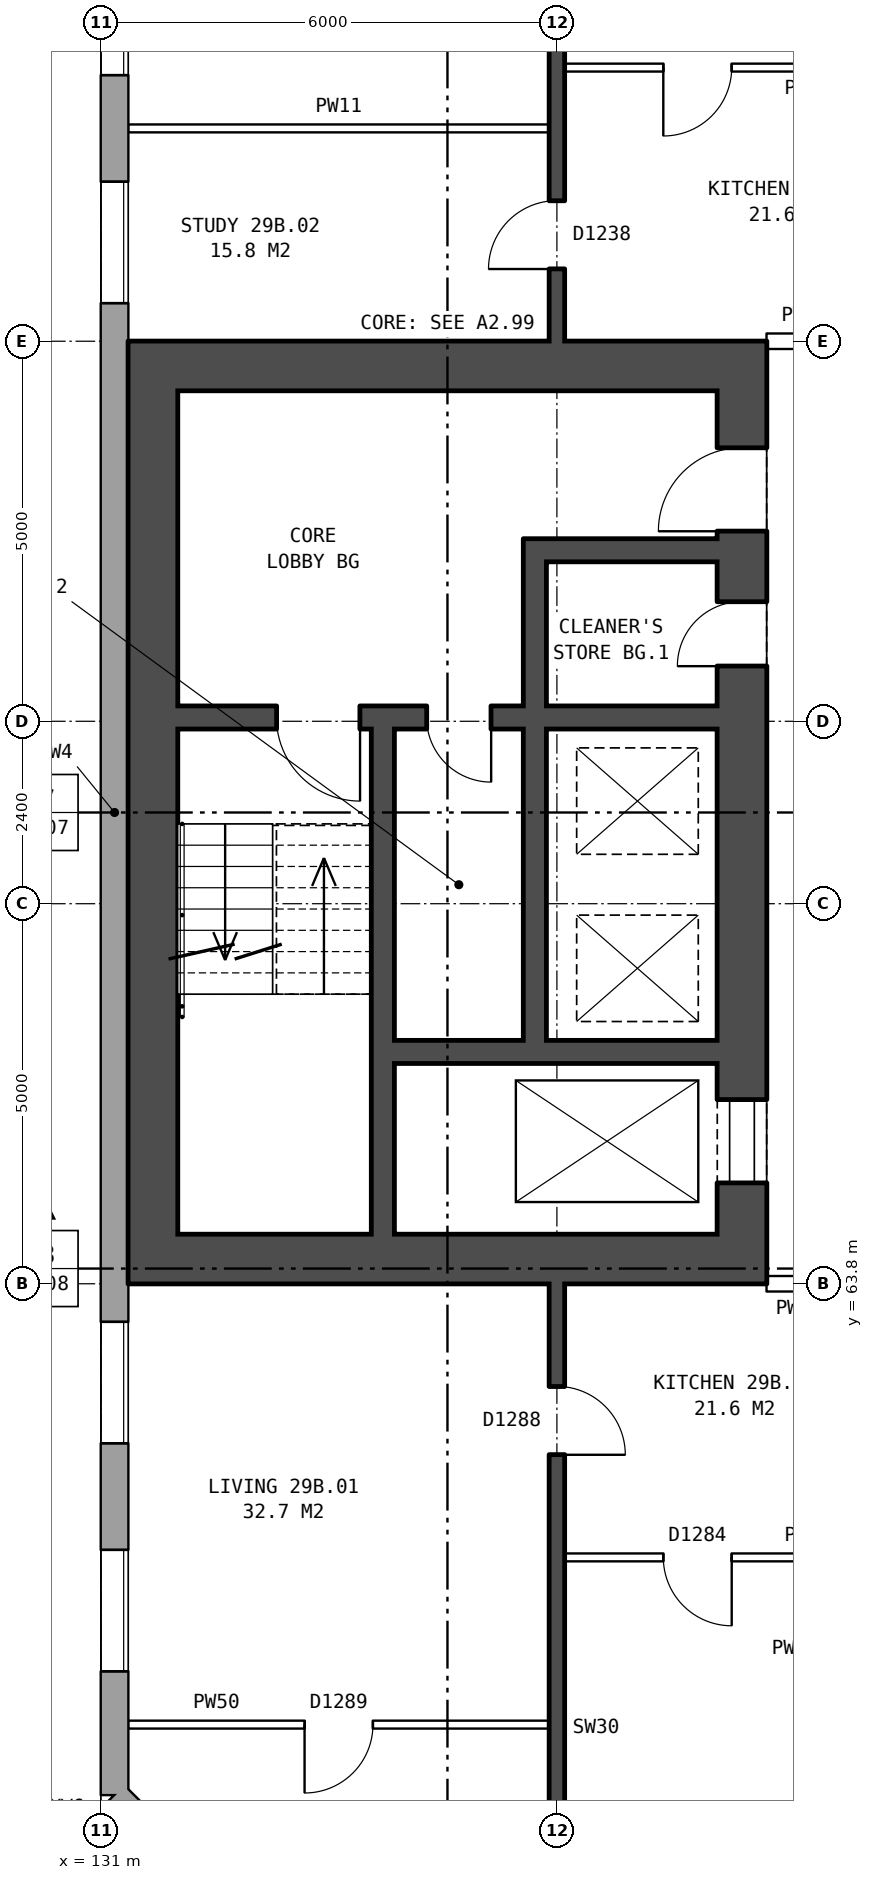
"""IFC4 building model, lengths in metres.
Left out: names, types, materials, properties, quantities, classifications, styles, units other than length and angle.
Written with IfcOpenShell. Run it as: python <this file> out.ifc"""

import sys

from ifc_helpers import new_model, si_unit, direction, frame, frame_2d, origin, place, context, subcontext, project, spatial, rectangle, extrude, element, fill, save


model = new_model("IFC4")
c1 = context("Model", 3, precision=1e-05, world=origin(), true_north=direction((0.0, 1.0)))
c2 = subcontext(c1, "Body", "Model", "MODEL_VIEW")
j1 = project(units=[si_unit("LENGTHUNIT", "METRE"), si_unit("PLANEANGLEUNIT", "RADIAN")], contexts=[c1])
p1 = place(None, origin())
s1 = spatial("IfcSite", under=j1, at=p1, CompositionType="ELEMENT")
p2 = place(p1, origin())
s2 = spatial("IfcBuilding", under=s1, at=p2, CompositionType="ELEMENT")
p3 = place(p2, frame((0.0, 0.0, 105.7)))
s3 = spatial("IfcBuildingStorey", under=s2, at=p3, CompositionType="ELEMENT", Elevation=105.7)
p4 = place(p3, frame((131.18, 57.075, 0.0), z_axis=(0.0, 0.0, 1.0), x_axis=(0.707106781187, -0.707106781187, 0.0)))
e1 = element("IfcWall", 1, at=p4, inside=s3, PredefinedType="STANDARD", context=c2, shape_type="SweptSolid", body=[
    extrude(rectangle(XDim=4.094, YDim=0.36, at=frame_2d((2.047, 0.0))), origin(), (0.0, 0.0, 1.0), 2.85),
])
p5 = place(p4, frame((1.247, 0.0, 0.8)))
e2 = element("IfcOpeningElement", 2, at=p5, cuts=e1, PredefinedType="OPENING", context=c2, shape_type="SweptSolid", body=[
    extrude(rectangle(XDim=1.6, YDim=1.8, at=frame_2d((0.8, 0.9))), frame((0.0, 0.19, 0.0), z_axis=(0.0, -1.0, 0.0), x_axis=(1.0, 0.0, 0.0)), (0.0, 0.0, 1.0), 0.38),
])
p6 = place(p3, frame((131.18, 82.925, 0.0), z_axis=(0.0, 0.0, 1.0), x_axis=(0.0, -1.0, 0.0)))
e3 = element("IfcWall", 3, at=p6, inside=s3, PredefinedType="STANDARD", context=c2, shape_type="SweptSolid", body=[
    extrude(rectangle(XDim=25.851, YDim=0.36, at=frame_2d((12.925, 0.0))), origin(), (0.0, 0.0, 1.0), 2.85),
])
p7 = place(p6, frame((1.625, 0.0, 0.8)))
e4 = element("IfcOpeningElement", 4, at=p7, cuts=e3, PredefinedType="OPENING", context=c2, shape_type="SweptSolid", body=[
    extrude(rectangle(XDim=1.6, YDim=1.8, at=frame_2d((0.8, 0.9))), frame((0.0, 0.19, 0.0), z_axis=(0.0, -1.0, 0.0), x_axis=(1.0, 0.0, 0.0)), (0.0, 0.0, 1.0), 0.38),
])
p8 = place(p6, frame((4.625, 0.0, 0.8)))
e5 = element("IfcOpeningElement", 5, at=p8, cuts=e3, PredefinedType="OPENING", context=c2, shape_type="SweptSolid", body=[
    extrude(rectangle(XDim=1.6, YDim=1.8, at=frame_2d((0.8, 0.9))), frame((0.0, 0.19, 0.0), z_axis=(0.0, -1.0, 0.0), x_axis=(1.0, 0.0, 0.0)), (0.0, 0.0, 1.0), 0.38),
])
p9 = place(p6, frame((19.625, 0.0, 0.8)))
e6 = element("IfcOpeningElement", 6, at=p9, cuts=e3, PredefinedType="OPENING", context=c2, shape_type="SweptSolid", body=[
    extrude(rectangle(XDim=1.6, YDim=1.8, at=frame_2d((0.8, 0.9))), frame((0.0, 0.19, 0.0), z_axis=(0.0, -1.0, 0.0), x_axis=(1.0, 0.0, 0.0)), (0.0, 0.0, 1.0), 0.38),
])
p10 = place(p6, frame((22.625, 0.0, 0.8)))
e7 = element("IfcOpeningElement", 7, at=p10, cuts=e3, PredefinedType="OPENING", context=c2, shape_type="SweptSolid", body=[
    extrude(rectangle(XDim=1.6, YDim=1.8, at=frame_2d((0.8, 0.9))), frame((0.0, 0.19, 0.0), z_axis=(0.0, -1.0, 0.0), x_axis=(1.0, 0.0, 0.0)), (0.0, 0.0, 1.0), 0.38),
])
p11 = place(p3, frame((139.435, 64.45, 0.0), z_axis=(0.0, 0.0, 1.0), x_axis=(0.0, 1.0, 0.0)))
e8 = element("IfcWall", 8, at=p11, inside=s3, PredefinedType="SHEAR", context=c2, shape_type="SweptSolid", body=[
    extrude(rectangle(XDim=11.1, YDim=0.65, at=frame_2d((5.55, 0.0))), origin(), (0.0, 0.0, 1.0), 2.85),
])
p12 = place(p11, frame((0.675, 0.0, 0.0)))
e9 = element("IfcOpeningElement", 9, at=p12, cuts=e8, PredefinedType="OPENING", context=c2, shape_type="SweptSolid", body=[
    extrude(rectangle(XDim=1.1, YDim=2.1, at=frame_2d((0.55, 1.05))), frame((0.0, 0.335, 0.0), z_axis=(0.0, -1.0, 0.0), x_axis=(1.0, 0.0, 0.0)), (0.0, 0.0, 1.0), 0.67),
])
p13 = place(p11, frame((9.25, 0.0, 0.0)))
e10 = element("IfcOpeningElement", 10, at=p13, cuts=e8, PredefinedType="OPENING", context=c2, shape_type="SweptSolid", body=[
    extrude(rectangle(XDim=1.1, YDim=2.1, at=frame_2d((0.55, 1.05))), frame((0.0, 0.335, 0.0), z_axis=(0.0, -1.0, 0.0), x_axis=(1.0, 0.0, 0.0)), (0.0, 0.0, 1.0), 0.67),
])
p14 = place(p11, frame((7.475, 0.0, 0.0)))
e11 = element("IfcOpeningElement", 11, at=p14, cuts=e8, PredefinedType="OPENING", context=c2, shape_type="SweptSolid", body=[
    extrude(rectangle(XDim=0.85, YDim=2.1, at=frame_2d((0.425, 1.05))), frame((0.0, 0.335, 0.0), z_axis=(0.0, -1.0, 0.0), x_axis=(1.0, 0.0, 0.0)), (0.0, 0.0, 1.0), 0.67),
])
p15 = place(p3, frame((131.685, 64.45, 0.0), z_axis=(0.0, 0.0, 1.0), x_axis=(0.0, 1.0, 0.0)))
e12 = element("IfcWall", 12, at=p15, inside=s3, PredefinedType="SHEAR", context=c2, shape_type="SweptSolid", body=[
    extrude(rectangle(XDim=11.1, YDim=0.65, at=frame_2d((5.55, 0.0))), origin(), (0.0, 0.0, 1.0), 2.85),
])
for number, where, z_axis, x_axis in (
    (13, (139.76, 64.125, 0.0), (0.0, 0.0, 1.0), (-1.0, 0.0, 0.0)),
    (14, (139.76, 75.875, 0.0), (0.0, 0.0, 1.0), (-1.0, 0.0, 0.0)),
):
    element("IfcWall", number, at=place(p3, frame(where, z_axis=z_axis, x_axis=x_axis)), inside=s3, PredefinedType="SHEAR", context=c2, shape_type="SweptSolid", body=[
        extrude(rectangle(XDim=8.4, YDim=0.65, at=frame_2d((4.2, 0.0))), origin(), (0.0, 0.0, 1.0), 2.85),
    ])
p16 = place(p3, frame((139.11, 66.85, 0.0), z_axis=(0.0, 0.0, 1.0), x_axis=(-1.0, 0.0, 0.0)))
e15 = element("IfcWall", 15, at=p16, inside=s3, PredefinedType="SHEAR", context=c2, shape_type="SweptSolid", body=[
    extrude(rectangle(XDim=4.25, YDim=0.3, at=frame_2d((2.125, 0.0))), origin(), (0.0, 0.0, 1.0), 2.85),
])
p17 = place(p3, frame((139.11, 71.25, 0.0), z_axis=(0.0, 0.0, 1.0), x_axis=(-1.0, 0.0, 0.0)))
e16 = element("IfcWall", 16, at=p17, inside=s3, PredefinedType="SHEAR", context=c2, shape_type="SweptSolid", body=[
    extrude(rectangle(XDim=7.1, YDim=0.3, at=frame_2d((3.55, 0.0))), origin(), (0.0, 0.0, 1.0), 2.85),
])
p18 = place(p17, frame((4.7, 0.0, 0.0)))
e17 = element("IfcOpeningElement", 17, at=p18, cuts=e16, PredefinedType="OPENING", context=c2, shape_type="SweptSolid", body=[
    extrude(rectangle(XDim=1.1, YDim=2.1, at=frame_2d((0.55, 1.05))), frame((0.0, 0.16, 0.0), z_axis=(0.0, -1.0, 0.0), x_axis=(1.0, 0.0, 0.0)), (0.0, 0.0, 1.0), 0.32),
])
p19 = place(p17, frame((2.975, 0.0, 0.0)))
e18 = element("IfcOpeningElement", 18, at=p19, cuts=e16, PredefinedType="OPENING", context=c2, shape_type="SweptSolid", body=[
    extrude(rectangle(XDim=0.85, YDim=2.1, at=frame_2d((0.425, 1.05))), frame((0.0, 0.16, 0.0), z_axis=(0.0, -1.0, 0.0), x_axis=(1.0, 0.0, 0.0)), (0.0, 0.0, 1.0), 0.32),
])
p20 = place(p3, frame((139.11, 73.45, 0.0), z_axis=(0.0, 0.0, 1.0), x_axis=(-1.0, 0.0, 0.0)))
e19 = element("IfcWall", 19, at=p20, inside=s3, PredefinedType="SHEAR", context=c2, shape_type="SweptSolid", body=[
    extrude(rectangle(XDim=2.25, YDim=0.3, at=frame_2d((1.125, 0.0))), origin(), (0.0, 0.0, 1.0), 2.85),
])
p21 = place(p3, frame((136.71, 67.0, 0.0), z_axis=(0.0, 0.0, 1.0), x_axis=(0.0, 1.0, 0.0)))
e20 = element("IfcWall", 20, at=p21, inside=s3, PredefinedType="SHEAR", context=c2, shape_type="SweptSolid", body=[
    extrude(rectangle(XDim=4.1, YDim=0.3, at=frame_2d((2.05, 0.0))), origin(), (0.0, 0.0, 1.0), 2.85),
])
p22 = place(p3, frame((136.71, 71.4, 0.0), z_axis=(0.0, 0.0, 1.0), x_axis=(0.0, 1.0, 0.0)))
e21 = element("IfcWall", 21, at=p22, inside=s3, PredefinedType="SHEAR", context=c2, shape_type="SweptSolid", body=[
    extrude(rectangle(XDim=2.2, YDim=0.3, at=frame_2d((1.1, 0.0))), origin(), (0.0, 0.0, 1.0), 2.85),
])
p23 = place(p3, frame((134.71, 64.45, 0.0), z_axis=(0.0, 0.0, 1.0), x_axis=(0.0, 1.0, 0.0)))
e22 = element("IfcWall", 22, at=p23, inside=s3, PredefinedType="SHEAR", context=c2, shape_type="SweptSolid", body=[
    extrude(rectangle(XDim=6.65, YDim=0.3, at=frame_2d((3.325, 0.0))), origin(), (0.0, 0.0, 1.0), 2.85),
])
p24 = place(p3, frame((131.36, 58.0, 0.0), z_axis=(0.0, 0.0, 1.0), x_axis=(1.0, 0.0, 0.0)))
e23 = element("IfcWall", 23, at=p24, inside=s3, PredefinedType="PARTITIONING", context=c2, shape_type="SweptSolid", body=[
    extrude(rectangle(XDim=5.54, YDim=0.1, at=frame_2d((2.77, 0.0))), origin(), (0.0, 0.0, 1.0), 2.85),
])
p25 = place(p24, frame((2.32, 0.0, 0.0)))
e24 = element("IfcOpeningElement", 24, at=p25, cuts=e23, PredefinedType="OPENING", context=c2, shape_type="SweptSolid", body=[
    extrude(rectangle(XDim=0.9, YDim=2.1, at=frame_2d((0.45, 1.05))), frame((0.0, 0.06, 0.0), z_axis=(0.0, -1.0, 0.0), x_axis=(1.0, 0.0, 0.0)), (0.0, 0.0, 1.0), 0.12),
])
p26 = place(p3, frame((137.1, 60.2, 0.0), z_axis=(0.0, 0.0, 1.0), x_axis=(1.0, 0.0, 0.0)))
e25 = element("IfcWall", 25, at=p26, inside=s3, PredefinedType="PARTITIONING", context=c2, shape_type="SweptSolid", body=[
    extrude(rectangle(XDim=5.8, YDim=0.1, at=frame_2d((2.9, 0.0))), origin(), (0.0, 0.0, 1.0), 2.85),
])
p27 = place(p26, frame((1.3, 0.0, 0.0)))
e26 = element("IfcOpeningElement", 26, at=p27, cuts=e25, PredefinedType="OPENING", context=c2, shape_type="SweptSolid", body=[
    extrude(rectangle(XDim=0.9, YDim=2.1, at=frame_2d((0.45, 1.05))), frame((0.0, 0.06, 0.0), z_axis=(0.0, -1.0, 0.0), x_axis=(1.0, 0.0, 0.0)), (0.0, 0.0, 1.0), 0.12),
])
p28 = place(p26, frame((4.2, 0.0, 0.0)))
e27 = element("IfcOpeningElement", 27, at=p28, cuts=e25, PredefinedType="OPENING", context=c2, shape_type="SweptSolid", body=[
    extrude(rectangle(XDim=0.9, YDim=2.1, at=frame_2d((0.45, 1.05))), frame((0.0, 0.06, 0.0), z_axis=(0.0, -1.0, 0.0), x_axis=(1.0, 0.0, 0.0)), (0.0, 0.0, 1.0), 0.12),
])
p29 = place(p3, frame((139.76, 63.8, 0.0), z_axis=(0.0, 0.0, 1.0), x_axis=(1.0, 0.0, 0.0)))
e28 = element("IfcWall", 28, at=p29, inside=s3, PredefinedType="PARTITIONING", context=c2, shape_type="SweptSolid", body=[
    extrude(rectangle(XDim=3.0, YDim=0.2, at=frame_2d((1.5, 0.0))), origin(), (0.0, 0.0, 1.0), 2.85),
])
p30 = place(p29, frame((1.0, 0.0, 0.0)))
e29 = element("IfcOpeningElement", 29, at=p30, cuts=e28, PredefinedType="OPENING", context=c2, shape_type="SweptSolid", body=[
    extrude(rectangle(XDim=1.0, YDim=2.1, at=frame_2d((0.5, 1.05))), frame((0.0, 0.11, 0.0), z_axis=(0.0, -1.0, 0.0), x_axis=(1.0, 0.0, 0.0)), (0.0, 0.0, 1.0), 0.22),
])
p31 = place(p3, frame((139.76, 76.2, 0.0), z_axis=(0.0, 0.0, 1.0), x_axis=(1.0, 0.0, 0.0)))
e30 = element("IfcWall", 30, at=p31, inside=s3, PredefinedType="PARTITIONING", context=c2, shape_type="SweptSolid", body=[
    extrude(rectangle(XDim=3.0, YDim=0.2, at=frame_2d((1.5, 0.0))), origin(), (0.0, 0.0, 1.0), 2.85),
])
p32 = place(p31, frame((1.0, 0.0, 0.0)))
e31 = element("IfcOpeningElement", 31, at=p32, cuts=e30, PredefinedType="OPENING", context=c2, shape_type="SweptSolid", body=[
    extrude(rectangle(XDim=1.0, YDim=2.1, at=frame_2d((0.5, 1.05))), frame((0.0, 0.11, 0.0), z_axis=(0.0, -1.0, 0.0), x_axis=(1.0, 0.0, 0.0)), (0.0, 0.0, 1.0), 0.22),
])
p33 = place(p3, frame((131.36, 79.0, 0.0), z_axis=(0.0, 0.0, 1.0), x_axis=(1.0, 0.0, 0.0)))
e32 = element("IfcWall", 32, at=p33, inside=s3, PredefinedType="PARTITIONING", context=c2, shape_type="SweptSolid", body=[
    extrude(rectangle(XDim=5.54, YDim=0.1, at=frame_2d((2.77, 0.0))), origin(), (0.0, 0.0, 1.0), 2.85),
])
p34 = place(p3, frame((137.1, 79.8, 0.0), z_axis=(0.0, 0.0, 1.0), x_axis=(1.0, 0.0, 0.0)))
e33 = element("IfcWall", 33, at=p34, inside=s3, PredefinedType="PARTITIONING", context=c2, shape_type="SweptSolid", body=[
    extrude(rectangle(XDim=5.8, YDim=0.1, at=frame_2d((2.9, 0.0))), origin(), (0.0, 0.0, 1.0), 2.85),
])
p35 = place(p34, frame((1.3, 0.0, 0.0)))
e34 = element("IfcOpeningElement", 34, at=p35, cuts=e33, PredefinedType="OPENING", context=c2, shape_type="SweptSolid", body=[
    extrude(rectangle(XDim=0.9, YDim=2.1, at=frame_2d((0.45, 1.05))), frame((0.0, 0.06, 0.0), z_axis=(0.0, -1.0, 0.0), x_axis=(1.0, 0.0, 0.0)), (0.0, 0.0, 1.0), 0.12),
])
p36 = place(p34, frame((4.2, 0.0, 0.0)))
e35 = element("IfcOpeningElement", 35, at=p36, cuts=e33, PredefinedType="OPENING", context=c2, shape_type="SweptSolid", body=[
    extrude(rectangle(XDim=0.9, YDim=2.1, at=frame_2d((0.45, 1.05))), frame((0.0, 0.06, 0.0), z_axis=(0.0, -1.0, 0.0), x_axis=(1.0, 0.0, 0.0)), (0.0, 0.0, 1.0), 0.12),
])
p37 = place(p3, frame((137.0, 54.36, 0.0), z_axis=(0.0, 0.0, 1.0), x_axis=(0.0, 1.0, 0.0)))
e36 = element("IfcWall", 36, at=p37, inside=s3, PredefinedType="SOLIDWALL", context=c2, shape_type="SweptSolid", body=[
    extrude(rectangle(XDim=9.44, YDim=0.2, at=frame_2d((4.72, 0.0))), origin(), (0.0, 0.0, 1.0), 2.85),
])
p38 = place(p37, frame((7.19, 0.0, 0.0)))
e37 = element("IfcOpeningElement", 37, at=p38, cuts=e36, PredefinedType="OPENING", context=c2, shape_type="SweptSolid", body=[
    extrude(rectangle(XDim=0.9, YDim=2.1, at=frame_2d((0.45, 1.05))), frame((0.0, 0.11, 0.0), z_axis=(0.0, -1.0, 0.0), x_axis=(1.0, 0.0, 0.0)), (0.0, 0.0, 1.0), 0.22),
])
p39 = place(p3, frame((137.0, 76.2, 0.0), z_axis=(0.0, 0.0, 1.0), x_axis=(0.0, 1.0, 0.0)))
e38 = element("IfcWall", 38, at=p39, inside=s3, PredefinedType="SOLIDWALL", context=c2, shape_type="SweptSolid", body=[
    extrude(rectangle(XDim=9.44, YDim=0.2, at=frame_2d((4.72, 0.0))), origin(), (0.0, 0.0, 1.0), 2.85),
])
p40 = place(p39, frame((6.07, 0.0, 0.0)))
e39 = element("IfcOpeningElement", 39, at=p40, cuts=e38, PredefinedType="OPENING", context=c2, shape_type="SweptSolid", body=[
    extrude(rectangle(XDim=0.9, YDim=2.1, at=frame_2d((0.45, 1.05))), frame((0.0, 0.11, 0.0), z_axis=(0.0, -1.0, 0.0), x_axis=(1.0, 0.0, 0.0)), (0.0, 0.0, 1.0), 0.22),
])
p41 = place(p39, frame((0.95, 0.0, 0.0)))
e40 = element("IfcOpeningElement", 40, at=p41, cuts=e38, PredefinedType="OPENING", context=c2, shape_type="SweptSolid", body=[
    extrude(rectangle(XDim=0.9, YDim=2.1, at=frame_2d((0.45, 1.05))), frame((0.0, 0.11, 0.0), z_axis=(0.0, -1.0, 0.0), x_axis=(1.0, 0.0, 0.0)), (0.0, 0.0, 1.0), 0.22),
])
p42 = place(p7, origin())
e41 = element("IfcWindow", 41, at=p42, inside=s3, PartitioningType="SINGLE_PANEL", PredefinedType="WINDOW", context=c2, shape_type="SweptSolid", body=[
    extrude(rectangle(XDim=1.6, YDim=1.8, at=frame_2d((0.8, 0.9))), frame((0.0, 0.15, 0.0), z_axis=(0.0, -1.0, 0.0), x_axis=(1.0, 0.0, 0.0)), (0.0, 0.0, 1.0), 0.06),
])
fill(e4, e41)
p43 = place(p8, origin())
e42 = element("IfcWindow", 42, at=p43, inside=s3, PartitioningType="SINGLE_PANEL", PredefinedType="WINDOW", context=c2, shape_type="SweptSolid", body=[
    extrude(rectangle(XDim=1.6, YDim=1.8, at=frame_2d((0.8, 0.9))), frame((0.0, 0.15, 0.0), z_axis=(0.0, -1.0, 0.0), x_axis=(1.0, 0.0, 0.0)), (0.0, 0.0, 1.0), 0.06),
])
fill(e5, e42)
p44 = place(p9, origin())
e43 = element("IfcWindow", 43, at=p44, inside=s3, PartitioningType="SINGLE_PANEL", PredefinedType="WINDOW", context=c2, shape_type="SweptSolid", body=[
    extrude(rectangle(XDim=1.6, YDim=1.8, at=frame_2d((0.8, 0.9))), frame((0.0, 0.15, 0.0), z_axis=(0.0, -1.0, 0.0), x_axis=(1.0, 0.0, 0.0)), (0.0, 0.0, 1.0), 0.06),
])
fill(e6, e43)
p45 = place(p10, origin())
e44 = element("IfcWindow", 44, at=p45, inside=s3, PartitioningType="SINGLE_PANEL", PredefinedType="WINDOW", context=c2, shape_type="SweptSolid", body=[
    extrude(rectangle(XDim=1.6, YDim=1.8, at=frame_2d((0.8, 0.9))), frame((0.0, 0.15, 0.0), z_axis=(0.0, -1.0, 0.0), x_axis=(1.0, 0.0, 0.0)), (0.0, 0.0, 1.0), 0.06),
])
fill(e7, e44)
p46 = place(p12, origin())
e45 = element("IfcDoor", 45, at=p46, inside=s3, OperationType="DOUBLE_DOOR_SLIDING", PredefinedType="DOOR", context=c2, shape_type="SweptSolid", body=[
    extrude(rectangle(XDim=1.1, YDim=2.1, at=frame_2d((0.55, 1.05))), frame((0.0, 0.31, 0.0), z_axis=(0.0, -1.0, 0.0), x_axis=(1.0, 0.0, 0.0)), (0.0, 0.0, 1.0), 0.05),
])
fill(e9, e45)
p47 = place(p13, origin())
e46 = element("IfcDoor", 46, at=p47, inside=s3, OperationType="SINGLE_SWING_LEFT", PredefinedType="DOOR", context=c2, shape_type="SweptSolid", body=[
    extrude(rectangle(XDim=1.1, YDim=2.1, at=frame_2d((0.55, 1.05))), frame((0.0, 0.31, 0.0), z_axis=(0.0, -1.0, 0.0), x_axis=(1.0, 0.0, 0.0)), (0.0, 0.0, 1.0), 0.05),
])
fill(e10, e46)
p48 = place(p18, origin())
e47 = element("IfcDoor", 47, at=p48, inside=s3, OperationType="SINGLE_SWING_LEFT", PredefinedType="DOOR", context=c2, shape_type="SweptSolid", body=[
    extrude(rectangle(XDim=1.1, YDim=2.1, at=frame_2d((0.55, 1.05))), frame((0.0, 0.025, 0.0), z_axis=(0.0, -1.0, 0.0), x_axis=(1.0, 0.0, 0.0)), (0.0, 0.0, 1.0), 0.05),
])
fill(e17, e47)
p49 = place(p14, origin())
e48 = element("IfcDoor", 48, at=p49, inside=s3, OperationType="SINGLE_SWING_LEFT", PredefinedType="DOOR", context=c2, shape_type="SweptSolid", body=[
    extrude(rectangle(XDim=0.85, YDim=2.1, at=frame_2d((0.425, 1.05))), frame((0.0, 0.31, 0.0), z_axis=(0.0, -1.0, 0.0), x_axis=(1.0, 0.0, 0.0)), (0.0, 0.0, 1.0), 0.05),
])
fill(e11, e48)
p50 = place(p19, origin())
e49 = element("IfcDoor", 49, at=p50, inside=s3, OperationType="SINGLE_SWING_LEFT", PredefinedType="DOOR", context=c2, shape_type="SweptSolid", body=[
    extrude(rectangle(XDim=0.85, YDim=2.1, at=frame_2d((0.425, 1.05))), frame((0.0, 0.025, 0.0), z_axis=(0.0, -1.0, 0.0), x_axis=(1.0, 0.0, 0.0)), (0.0, 0.0, 1.0), 0.05),
])
fill(e18, e49)
p51 = place(p27, frame((0.9, 0.0, 0.0), z_axis=(0.0, 0.0, 1.0), x_axis=(-1.0, 0.0, 0.0)))
e50 = element("IfcDoor", 50, at=p51, inside=s3, OperationType="SINGLE_SWING_LEFT", PredefinedType="DOOR", context=c2, shape_type="SweptSolid", body=[
    extrude(rectangle(XDim=0.9, YDim=2.1, at=frame_2d((0.45, 1.05))), frame((0.0, 0.025, 0.0), z_axis=(0.0, -1.0, 0.0), x_axis=(1.0, 0.0, 0.0)), (0.0, 0.0, 1.0), 0.05),
])
fill(e26, e50)
p52 = place(p25, frame((0.9, 0.0, 0.0), z_axis=(0.0, 0.0, 1.0), x_axis=(-1.0, 0.0, 0.0)))
e51 = element("IfcDoor", 51, at=p52, inside=s3, OperationType="SINGLE_SWING_RIGHT", PredefinedType="DOOR", context=c2, shape_type="SweptSolid", body=[
    extrude(rectangle(XDim=0.9, YDim=2.1, at=frame_2d((0.45, 1.05))), frame((0.0, 0.025, 0.0), z_axis=(0.0, -1.0, 0.0), x_axis=(1.0, 0.0, 0.0)), (0.0, 0.0, 1.0), 0.05),
])
fill(e24, e51)
p53 = place(p38, frame((0.9, 0.0, 0.0), z_axis=(0.0, 0.0, 1.0), x_axis=(-1.0, 0.0, 0.0)))
e52 = element("IfcDoor", 52, at=p53, inside=s3, OperationType="SINGLE_SWING_RIGHT", PredefinedType="DOOR", context=c2, shape_type="SweptSolid", body=[
    extrude(rectangle(XDim=0.9, YDim=2.1, at=frame_2d((0.45, 1.05))), frame((0.0, 0.025, 0.0), z_axis=(0.0, -1.0, 0.0), x_axis=(1.0, 0.0, 0.0)), (0.0, 0.0, 1.0), 0.05),
])
fill(e37, e52)
p54 = place(p41, origin())
e53 = element("IfcDoor", 53, at=p54, inside=s3, OperationType="SINGLE_SWING_LEFT", PredefinedType="DOOR", context=c2, shape_type="SweptSolid", body=[
    extrude(rectangle(XDim=0.9, YDim=2.1, at=frame_2d((0.45, 1.05))), frame((0.0, 0.025, 0.0), z_axis=(0.0, -1.0, 0.0), x_axis=(1.0, 0.0, 0.0)), (0.0, 0.0, 1.0), 0.05),
])
fill(e40, e53)
p55 = place(p35, frame((0.9, 0.0, 0.0), z_axis=(0.0, 0.0, 1.0), x_axis=(-1.0, 0.0, 0.0)))
e54 = element("IfcDoor", 54, at=p55, inside=s3, OperationType="SINGLE_SWING_RIGHT", PredefinedType="DOOR", context=c2, shape_type="SweptSolid", body=[
    extrude(rectangle(XDim=0.9, YDim=2.1, at=frame_2d((0.45, 1.05))), frame((0.0, 0.025, 0.0), z_axis=(0.0, -1.0, 0.0), x_axis=(1.0, 0.0, 0.0)), (0.0, 0.0, 1.0), 0.05),
])
fill(e34, e54)
save(model, sys.argv[1])
